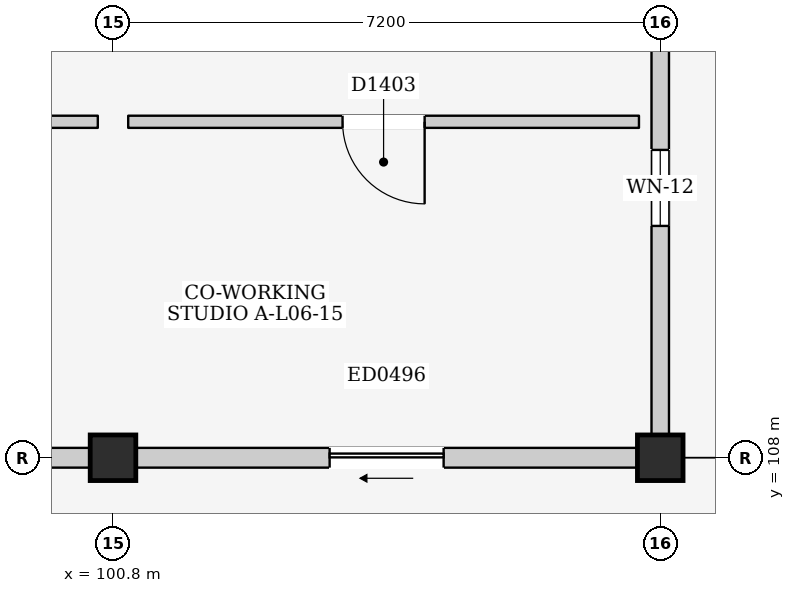
"""IFC4 building model, lengths in metres.
Left out: names, types, materials, properties, quantities, classifications, styles, units other than length and angle.
Written with IfcOpenShell. Run it as: python <this file> out.ifc"""

import sys

from ifc_helpers import new_model, si_unit, direction, frame, frame_2d, origin, origin_2d, place, context, subcontext, project, spatial, rectangle, extrude, element, fill, save


model = new_model("IFC4")
c1 = context("Model", 3, precision=1e-05, world=origin(), true_north=direction((0.0, 1.0)))
c2 = subcontext(c1, "Body", "Model", "MODEL_VIEW")
j1 = project(units=[si_unit("LENGTHUNIT", "METRE"), si_unit("PLANEANGLEUNIT", "RADIAN")], contexts=[c1])
p1 = place(None, origin())
s1 = spatial("IfcSite", under=j1, at=p1, CompositionType="ELEMENT")
p2 = place(p1, origin())
s2 = spatial("IfcBuilding", under=s1, at=p2, CompositionType="ELEMENT")
p3 = place(p2, frame((0.0, 0.0, 21.9)))
s3 = spatial("IfcBuildingStorey", under=s2, at=p3, CompositionType="ELEMENT", Elevation=21.9)
for number, where, z_axis, x_axis in (
    (1, (100.8, 108.0, 0.0), (0.0, 0.0, 1.0), (1.0, 0.0, 0.0)),
    (2, (108.0, 108.0, 0.0), (0.0, 0.0, 1.0), (1.0, 0.0, 0.0)),
):
    element("IfcColumn", number, at=place(p3, frame(where, z_axis=z_axis, x_axis=x_axis)), inside=s3, PredefinedType="COLUMN", context=c2, shape_type="SweptSolid", body=[
        extrude(rectangle(XDim=0.6, YDim=0.6, at=origin_2d()), origin(), (0.0, 0.0, 1.0), 3.2),
    ])
p4 = place(p3, frame((93.9, 108.0, 0.0), z_axis=(0.0, 0.0, 1.0), x_axis=(1.0, 0.0, 0.0)))
e3 = element("IfcWall", 3, at=p4, inside=s3, PredefinedType="ELEMENTEDWALL", context=c2, shape_type="SweptSolid", body=[
    extrude(rectangle(XDim=6.6, YDim=0.26, at=frame_2d((3.3, 0.0))), origin(), (0.0, 0.0, 1.0), 2.315),
])
p5 = place(p4, frame((2.55, 0.0, 0.0)))
e4 = element("IfcOpeningElement", 4, at=p5, cuts=e3, PredefinedType="OPENING", context=c2, shape_type="SweptSolid", body=[
    extrude(rectangle(XDim=1.5, YDim=2.12, at=frame_2d((0.75, 1.06))), frame((0.0, 0.145, 0.0), z_axis=(0.0, -1.0, 0.0), x_axis=(1.0, 0.0, 0.0)), (0.0, 0.0, 1.0), 0.29),
])
p6 = place(p3, frame((101.1, 108.0, 0.0), z_axis=(0.0, 0.0, 1.0), x_axis=(1.0, 0.0, 0.0)))
e5 = element("IfcWall", 5, at=p6, inside=s3, PredefinedType="ELEMENTEDWALL", context=c2, shape_type="SweptSolid", body=[
    extrude(rectangle(XDim=6.6, YDim=0.26, at=frame_2d((3.3, 0.0))), origin(), (0.0, 0.0, 1.0), 2.315),
])
p7 = place(p6, frame((2.55, 0.0, 0.0)))
e6 = element("IfcOpeningElement", 6, at=p7, cuts=e5, PredefinedType="OPENING", context=c2, shape_type="SweptSolid", body=[
    extrude(rectangle(XDim=1.5, YDim=2.12, at=frame_2d((0.75, 1.06))), frame((0.0, 0.145, 0.0), z_axis=(0.0, -1.0, 0.0), x_axis=(1.0, 0.0, 0.0)), (0.0, 0.0, 1.0), 0.29),
])
p8 = place(p3, frame((108.0, 108.3, 0.0), z_axis=(0.0, 0.0, 1.0), x_axis=(0.0, 1.0, 0.0)))
e7 = element("IfcWall", 7, at=p8, inside=s3, PredefinedType="ELEMENTEDWALL", context=c2, shape_type="SweptSolid", body=[
    extrude(rectangle(XDim=6.6, YDim=0.23, at=frame_2d((3.3, 0.0))), origin(), (0.0, 0.0, 1.0), 2.465),
])
p9 = place(p8, frame((2.75, 0.0, 1.1)))
e8 = element("IfcOpeningElement", 8, at=p9, cuts=e7, PredefinedType="OPENING", context=c2, shape_type="SweptSolid", body=[
    extrude(rectangle(XDim=1.0, YDim=0.9, at=frame_2d((0.5, 0.45))), frame((0.0, 0.13, 0.0), z_axis=(0.0, -1.0, 0.0), x_axis=(1.0, 0.0, 0.0)), (0.0, 0.0, 1.0), 0.26),
])
p10 = place(p3, frame((93.8, 112.42, 0.0), z_axis=(0.0, 0.0, 1.0), x_axis=(1.0, 0.0, 0.0)))
e9 = element("IfcWall", 9, at=p10, inside=s3, PredefinedType="PARTITIONING", context=c2, shape_type="SweptSolid", body=[
    extrude(rectangle(XDim=6.8, YDim=0.16, at=frame_2d((3.4, 0.0))), origin(), (0.0, 0.0, 1.0), 2.98),
])
p11 = place(p10, frame((2.86, 0.0, 0.0)))
e10 = element("IfcOpeningElement", 10, at=p11, cuts=e9, PredefinedType="OPENING", context=c2, shape_type="SweptSolid", body=[
    extrude(rectangle(XDim=1.08, YDim=2.22, at=frame_2d((0.54, 1.11))), frame((0.0, 0.095, 0.0), z_axis=(0.0, -1.0, 0.0), x_axis=(1.0, 0.0, 0.0)), (0.0, 0.0, 1.0), 0.19),
])
p12 = place(p3, frame((101.0, 112.42, 0.0), z_axis=(0.0, 0.0, 1.0), x_axis=(1.0, 0.0, 0.0)))
e11 = element("IfcWall", 11, at=p12, inside=s3, PredefinedType="PARTITIONING", context=c2, shape_type="SweptSolid", body=[
    extrude(rectangle(XDim=6.72, YDim=0.16, at=frame_2d((3.36, 0.0))), origin(), (0.0, 0.0, 1.0), 2.98),
])
p13 = place(p12, frame((2.82, 0.0, 0.0)))
e12 = element("IfcOpeningElement", 12, at=p13, cuts=e11, PredefinedType="OPENING", context=c2, shape_type="SweptSolid", body=[
    extrude(rectangle(XDim=1.08, YDim=2.22, at=frame_2d((0.54, 1.11))), frame((0.0, 0.095, 0.0), z_axis=(0.0, -1.0, 0.0), x_axis=(1.0, 0.0, 0.0)), (0.0, 0.0, 1.0), 0.19),
])
p14 = place(p7, frame((1.5, 0.0, 0.0), z_axis=(0.0, 0.0, 1.0), x_axis=(-1.0, 0.0, 0.0)))
e13 = element("IfcDoor", 13, at=p14, inside=s3, OperationType="SLIDING_TO_LEFT", PredefinedType="DOOR", context=c2, shape_type="SweptSolid", body=[
    extrude(rectangle(XDim=1.5, YDim=2.12, at=frame_2d((0.75, 1.06))), frame((0.0, 0.025, 0.0), z_axis=(0.0, -1.0, 0.0), x_axis=(1.0, 0.0, 0.0)), (0.0, 0.0, 1.0), 0.05),
])
fill(e6, e13)
p15 = place(p9, origin())
e14 = element("IfcWindow", 14, at=p15, inside=s3, PartitioningType="SINGLE_PANEL", PredefinedType="WINDOW", context=c2, shape_type="SweptSolid", body=[
    extrude(rectangle(XDim=1.0, YDim=0.9, at=frame_2d((0.5, 0.45))), frame((0.0, 0.03, 0.0), z_axis=(0.0, -1.0, 0.0), x_axis=(1.0, 0.0, 0.0)), (0.0, 0.0, 1.0), 0.06),
])
fill(e8, e14)
p16 = place(p13, frame((1.08, 0.0, 0.0), z_axis=(0.0, 0.0, 1.0), x_axis=(-1.0, 0.0, 0.0)))
e15 = element("IfcDoor", 15, at=p16, inside=s3, OperationType="SINGLE_SWING_LEFT", PredefinedType="DOOR", context=c2, shape_type="SweptSolid", body=[
    extrude(rectangle(XDim=1.08, YDim=2.22, at=frame_2d((0.54, 1.11))), frame((0.0, 0.025, 0.0), z_axis=(0.0, -1.0, 0.0), x_axis=(1.0, 0.0, 0.0)), (0.0, 0.0, 1.0), 0.05),
])
fill(e12, e15)
save(model, sys.argv[1])
